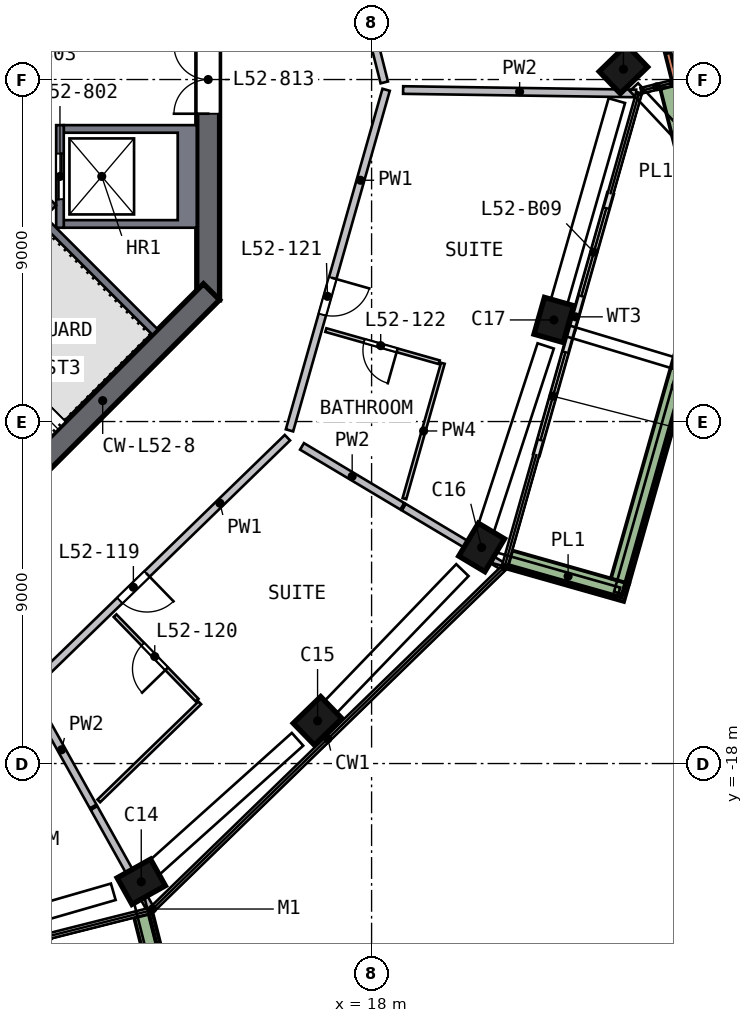
"""IFC4 building model, lengths in metres.
Left out: names, types, materials, properties, quantities, classifications, styles, units other than length and angle.
Written with IfcOpenShell. Run it as: python <this file> out.ifc"""

import sys

from ifc_helpers import new_model, si_unit, direction, frame, frame_2d, origin, origin_2d, place, context, subcontext, project, spatial, polyline, rectangle, outline, extrude, element, fill, save


model = new_model("IFC4")
c1 = context("Model", 3, precision=1e-05, world=origin(), true_north=direction((0.0, 1.0)))
c2 = subcontext(c1, "Body", "Model", "MODEL_VIEW")
j1 = project(units=[si_unit("LENGTHUNIT", "METRE"), si_unit("PLANEANGLEUNIT", "RADIAN")], contexts=[c1])
p1 = place(None, origin())
s1 = spatial("IfcSite", under=j1, at=p1, CompositionType="ELEMENT")
p2 = place(p1, origin())
s2 = spatial("IfcBuilding", under=s1, at=p2, CompositionType="ELEMENT")
p3 = place(p2, frame((0.0, 0.0, 212.5)))
s3 = spatial("IfcBuildingStorey", under=s2, at=p3, CompositionType="ELEMENT", Elevation=212.5)
p4 = place(p3, frame((11.818, -21.181, 0.0), z_axis=(0.100237911, 0.057070939, 0.993325359), x_axis=(-0.867359933, -0.484131141, 0.115342033)))
e1 = element("IfcColumn", 1, at=p4, inside=s3, PredefinedType="COLUMN", context=c2, shape_type="SweptSolid", body=[
    extrude(rectangle(XDim=1.0, YDim=0.8, at=origin_2d()), origin(), (0.0, 0.0, 1.0), 3.02),
])
p5 = place(p3, frame((16.482, -16.972, 0.0), z_axis=(0.080054672, 0.079084312, 0.993648288), x_axis=(0.712786983, 0.692295124, -0.112526346)))
e2 = element("IfcColumn", 2, at=p5, inside=s3, PredefinedType="COLUMN", context=c2, shape_type="SweptSolid", body=[
    extrude(rectangle(XDim=1.0, YDim=0.8, at=origin_2d()), origin(), (0.0, 0.0, 1.0), 3.019),
])
p6 = place(p3, frame((20.825, -12.434, 0.0), z_axis=(0.058283654, 0.099510649, 0.993328066), x_axis=(-0.509282854, -0.852837949, 0.115318722)))
e3 = element("IfcColumn", 3, at=p6, inside=s3, PredefinedType="COLUMN", context=c2, shape_type="SweptSolid", body=[
    extrude(rectangle(XDim=1.0, YDim=0.8, at=origin_2d()), origin(), (0.0, 0.0, 1.0), 3.02),
])
p7 = place(p3, frame((22.76, -6.458, 0.0), z_axis=(0.029838507, 0.108518363, 0.993646531), x_axis=(0.271559126, 0.955819005, -0.112541864)))
e4 = element("IfcColumn", 4, at=p7, inside=s3, PredefinedType="COLUMN", context=c2, shape_type="SweptSolid", body=[
    extrude(rectangle(XDim=1.0, YDim=0.8, at=origin_2d()), origin(), (0.0, 0.0, 1.0), 3.019),
])
p8 = place(p3, frame((24.629, 0.129, 0.0), z_axis=(-0.001616418, 0.117028664, 0.993127222), x_axis=(-0.719717147, -0.689631939, 0.080093807)))
e5 = element("IfcColumn", 5, at=p8, inside=s3, PredefinedType="COLUMN", context=c2, shape_type="SweptSolid", body=[
    extrude(rectangle(XDim=1.0, YDim=0.8, at=origin_2d()), origin(), (0.0, 0.0, 1.0), 3.021),
])
p9 = place(p3, frame((13.7, -5.799, 0.0), z_axis=(0.0, 0.0, 1.0), x_axis=(0.0, 1.0, 0.0)))
e6 = element("IfcWall", 6, at=p9, inside=s3, PredefinedType="SHEAR", context=c2, shape_type="SweptSolid", body=[
    extrude(rectangle(XDim=11.598, YDim=0.6, at=frame_2d((5.799, 0.0))), origin(), (0.0, 0.0, 1.0), 3.5),
])
p10 = place(p9, frame((4.899, 0.0, 0.0)))
e7 = element("IfcOpeningElement", 7, at=p10, cuts=e6, PredefinedType="OPENING", context=c2, shape_type="SweptSolid", body=[
    extrude(rectangle(XDim=1.8, YDim=2.1, at=frame_2d((0.9, 1.05))), frame((0.0, 0.31, 0.0), z_axis=(0.0, -1.0, 0.0), x_axis=(1.0, 0.0, 0.0)), (0.0, 0.0, 1.0), 0.62),
])
p11 = place(p3, frame((5.587, -13.788, 0.0), z_axis=(0.0, 0.0, 1.0), x_axis=(0.707106781, 0.707106781, 0.0)))
e8 = element("IfcWall", 8, at=p11, inside=s3, PredefinedType="SHEAR", context=c2, shape_type="SweptSolid", body=[
    extrude(rectangle(XDim=11.598, YDim=0.6, at=frame_2d((5.799, 0.0))), origin(), (0.0, 0.0, 1.0), 3.5),
])
p12 = place(p11, frame((2.099, 0.0, 0.0)))
e9 = element("IfcOpeningElement", 9, at=p12, cuts=e8, PredefinedType="OPENING", context=c2, shape_type="SweptSolid", body=[
    extrude(rectangle(XDim=1.2, YDim=2.1, at=frame_2d((0.6, 1.05))), frame((0.0, 0.31, 0.0), z_axis=(0.0, -1.0, 0.0), x_axis=(1.0, 0.0, 0.0)), (0.0, 0.0, 1.0), 0.62),
])
p13 = place(p3, frame((26.008, -0.142, 0.0), z_axis=(0.0, 0.0, 1.0), x_axis=(-0.244679801, 0.969603937, 0.0)))
e10 = element("IfcWall", 10, at=p13, inside=s3, PredefinedType="SOLIDWALL", context=c2, shape_type="SweptSolid", body=[
    extrude(rectangle(XDim=1.875, YDim=0.15, at=frame_2d((0.938, 0.0))), origin(), (0.0, 0.0, 1.0), 3.0),
])
p14 = place(p3, frame((22.337, -9.872, 0.0), z_axis=(0.0, 0.0, 1.0), x_axis=(0.272994706, 0.962015536, 0.0)))
e11 = element("IfcWall", 11, at=p14, inside=s3, PredefinedType="SOLIDWALL", context=c2, shape_type="SweptSolid", body=[
    extrude(rectangle(XDim=3.4, YDim=0.15, at=frame_2d((1.7, 0.0))), origin(), (0.0, 0.0, 1.0), 2.935),
])
p15 = place(p14, frame((0.4, 0.0, 0.0)))
e12 = element("IfcOpeningElement", 12, at=p15, cuts=e11, PredefinedType="OPENING", context=c2, shape_type="SweptSolid", body=[
    extrude(rectangle(XDim=2.4, YDim=2.4, at=frame_2d((1.2, 1.2))), frame((0.0, 0.085, 0.0), z_axis=(0.0, -1.0, 0.0), x_axis=(1.0, 0.0, 0.0)), (0.0, 0.0, 1.0), 0.17),
])
p16 = place(p3, frame((23.265, -6.601, 0.0), z_axis=(0.0, 0.0, 1.0), x_axis=(0.272953064, 0.962027351, 0.0)))
e13 = element("IfcWall", 13, at=p16, inside=s3, PredefinedType="SOLIDWALL", context=c2, shape_type="SweptSolid", body=[
    extrude(rectangle(XDim=3.74, YDim=0.15, at=frame_2d((1.87, 0.0))), origin(), (0.0, 0.0, 1.0), 2.935),
])
p17 = place(p16, frame((0.94, 0.0, 0.0)))
e14 = element("IfcOpeningElement", 14, at=p17, cuts=e13, PredefinedType="OPENING", context=c2, shape_type="SweptSolid", body=[
    extrude(rectangle(XDim=2.4, YDim=2.4, at=frame_2d((1.2, 1.2))), frame((0.0, 0.085, 0.0), z_axis=(0.0, -1.0, 0.0), x_axis=(1.0, 0.0, 0.0)), (0.0, 0.0, 1.0), 0.17),
])
p18 = place(p3, frame((12.655, -24.61, 0.0), z_axis=(0.0, 0.0, 1.0), x_axis=(-0.244684701, 0.969602701, 0.0)))
e15 = element("IfcWall", 15, at=p18, inside=s3, PredefinedType="SOLIDWALL", context=c2, shape_type="SweptSolid", body=[
    extrude(rectangle(XDim=2.699, YDim=0.5, at=frame_2d((1.35, 0.0))), origin(), (0.0, 0.0, 1.0), 0.7),
])
p19 = place(p3, frame((21.632, -12.634, 0.0), z_axis=(0.0, 0.0, 1.0), x_axis=(0.962020571, -0.272976962, 0.0)))
e16 = element("IfcWall", 16, at=p19, inside=s3, PredefinedType="SOLIDWALL", context=c2, shape_type="SweptSolid", body=[
    extrude(rectangle(XDim=3.199, YDim=0.5, at=frame_2d((1.6, 0.0))), origin(), (0.0, 0.0, 1.0), 0.7),
])
p20 = place(p3, frame((24.537, -13.199, 0.0), z_axis=(0.0, 0.0, 1.0), x_axis=(0.272958972, 0.962025675, 0.0)))
e17 = element("IfcWall", 17, at=p20, inside=s3, PredefinedType="SOLIDWALL", context=c2, shape_type="SweptSolid", body=[
    extrude(rectangle(XDim=10.653, YDim=0.5, at=frame_2d((5.326, 0.0))), origin(), (0.0, 0.0, 1.0), 0.7),
])
p21 = place(p3, frame((26.262, -1.864, 0.0), z_axis=(0.0, 0.0, 1.0), x_axis=(-0.244592852, 0.969625875, 0.0)))
e18 = element("IfcWall", 18, at=p21, inside=s3, PredefinedType="SOLIDWALL", context=c2, shape_type="SweptSolid", body=[
    extrude(rectangle(XDim=1.731, YDim=0.5, at=frame_2d((0.865, 0.0))), origin(), (0.0, 0.0, 1.0), 0.7),
])
p22 = place(p3, origin())
e19 = element("IfcWall", 19, at=p22, inside=s3, PredefinedType="SOLIDWALL", context=c2, shape_type="SweptSolid", body=[
    extrude(outline(polyline([(13.4, -3.9), (9.9, -3.9), (9.9, -3.7), (12.9, -3.7), (12.9, -1.4), (9.9, -1.4), (9.9, -1.2), (13.4, -1.2), (13.4, -3.9)])), origin(), (0.0, 0.0, 1.0), 3.0),
])
p23 = place(p3, frame((9.8, -1.2, 0.0), z_axis=(0.0, 0.0, 1.0), x_axis=(0.0, -1.0, 0.0)))
e20 = element("IfcWall", 20, at=p23, inside=s3, PredefinedType="SOLIDWALL", context=c2, shape_type="SweptSolid", body=[
    extrude(rectangle(XDim=2.7, YDim=0.2, at=frame_2d((1.35, 0.0))), origin(), (0.0, 0.0, 1.0), 3.0),
])
p24 = place(p23, frame((0.75, 0.0, 0.0)))
e21 = element("IfcOpeningElement", 21, at=p24, cuts=e20, PredefinedType="OPENING", context=c2, shape_type="SweptSolid", body=[
    extrude(rectangle(XDim=1.2, YDim=2.1, at=frame_2d((0.6, 1.05))), frame((0.0, 0.11, 0.0), z_axis=(0.0, -1.0, 0.0), x_axis=(1.0, 0.0, 0.0)), (0.0, 0.0, 1.0), 0.22),
])
p25 = place(p3, frame((9.629, -3.24, 0.0), z_axis=(0.0, 0.0, 1.0), x_axis=(-0.707120946, -0.707092617, 0.0)))
e22 = element("IfcWall", 22, at=p25, inside=s3, PredefinedType="SOLIDWALL", context=c2, shape_type="SweptSolid", body=[
    extrude(rectangle(XDim=8.618, YDim=0.2, at=frame_2d((4.309, 0.0))), origin(), (0.0, 0.0, 1.0), 3.0),
])
p26 = place(p25, frame((7.018, 0.0, 0.0)))
e23 = element("IfcOpeningElement", 23, at=p26, cuts=e22, PredefinedType="OPENING", context=c2, shape_type="SweptSolid", body=[
    extrude(rectangle(XDim=1.2, YDim=2.1, at=frame_2d((0.6, 1.05))), frame((0.0, 0.11, 0.0), z_axis=(0.0, -1.0, 0.0), x_axis=(1.0, 0.0, 0.0)), (0.0, 0.0, 1.0), 0.22),
])
p27 = place(p3, frame((9.334, -3.677, 0.0), z_axis=(0.0, 0.0, 1.0), x_axis=(0.707135845, -0.707077716, 0.0)))
e24 = element("IfcWall", 24, at=p27, inside=s3, PredefinedType="SOLIDWALL", context=c2, shape_type="SweptSolid", body=[
    extrude(rectangle(XDim=4.2, YDim=0.2, at=frame_2d((2.1, 0.0))), origin(), (0.0, 0.0, 1.0), 3.0),
])
p28 = place(p3, frame((15.785, -9.425, 0.0), z_axis=(0.0, 0.0, 1.0), x_axis=(-0.717395, -0.696666645, 0.0)))
e25 = element("IfcWall", 25, at=p28, inside=s3, PredefinedType="SOLIDWALL", context=c2, shape_type="SweptSolid", body=[
    extrude(rectangle(XDim=9.316, YDim=0.2, at=frame_2d((4.658, 0.0))), origin(), (0.0, 0.0, 1.0), 3.0),
])
p29 = place(p28, frame((5.15, 0.0, 0.0)))
e26 = element("IfcOpeningElement", 26, at=p29, cuts=e25, PredefinedType="OPENING", context=c2, shape_type="SweptSolid", body=[
    extrude(rectangle(XDim=1.0, YDim=2.1, at=frame_2d((0.5, 1.05))), frame((0.0, 0.11, 0.0), z_axis=(0.0, -1.0, 0.0), x_axis=(1.0, 0.0, 0.0)), (0.0, 0.0, 1.0), 0.22),
])
p30 = place(p3, frame((18.383, -0.27, 0.0), z_axis=(0.0, 0.0, 1.0), x_axis=(-0.272948627, -0.96202861, 0.0)))
e27 = element("IfcWall", 27, at=p30, inside=s3, PredefinedType="SOLIDWALL", context=c2, shape_type="SweptSolid", body=[
    extrude(rectangle(XDim=9.317, YDim=0.2, at=frame_2d((4.658, 0.0))), origin(), (0.0, 0.0, 1.0), 3.0),
])
p31 = place(p30, frame((5.15, 0.0, 0.0)))
e28 = element("IfcOpeningElement", 28, at=p31, cuts=e27, PredefinedType="OPENING", context=c2, shape_type="SweptSolid", body=[
    extrude(rectangle(XDim=1.0, YDim=2.1, at=frame_2d((0.5, 1.05))), frame((0.0, 0.11, 0.0), z_axis=(0.0, -1.0, 0.0), x_axis=(1.0, 0.0, 0.0)), (0.0, 0.0, 1.0), 0.22),
])
p32 = place(p3, frame((16.055, 8.958, 0.0), z_axis=(0.0, 0.0, 1.0), x_axis=(0.244643731, -0.969613039, 0.0)))
e29 = element("IfcWall", 29, at=p32, inside=s3, PredefinedType="SOLIDWALL", context=c2, shape_type="SweptSolid", body=[
    extrude(rectangle(XDim=9.317, YDim=0.2, at=frame_2d((4.658, 0.0))), origin(), (0.0, 0.0, 1.0), 3.0),
])
p33 = place(p32, frame((3.881, 0.0, 0.0)))
e30 = element("IfcOpeningElement", 30, at=p33, cuts=e29, PredefinedType="OPENING", context=c2, shape_type="SweptSolid", body=[
    extrude(rectangle(XDim=1.8, YDim=2.1, at=frame_2d((0.9, 1.05))), frame((0.0, 0.11, 0.0), z_axis=(0.0, -1.0, 0.0), x_axis=(1.0, 0.0, 0.0)), (0.0, 0.0, 1.0), 0.22),
])
p34 = place(p3, frame((9.008, -16.145, 0.0), z_axis=(0.0, 0.0, 1.0), x_axis=(0.487261051, -0.873256359, 0.0)))
e31 = element("IfcWall", 31, at=p34, inside=s3, PredefinedType="SOLIDWALL", context=c2, shape_type="SweptSolid", body=[
    extrude(rectangle(XDim=3.419, YDim=0.2, at=frame_2d((1.709, 0.0))), origin(), (0.0, 0.0, 1.0), 3.0),
])
p35 = place(p3, frame((10.696, -19.17, 0.0), z_axis=(0.0, 0.0, 1.0), x_axis=(0.487287097, -0.873241825, 0.0)))
e32 = element("IfcWall", 32, at=p35, inside=s3, PredefinedType="SOLIDWALL", context=c2, shape_type="SweptSolid", body=[
    extrude(rectangle(XDim=3.012, YDim=0.2, at=frame_2d((1.506, 0.0))), origin(), (0.0, 0.0, 1.0), 3.0),
])
p36 = place(p3, frame((16.169, -9.654, 0.0), z_axis=(0.0, 0.0, 1.0), x_axis=(0.858604919, -0.512637877, 0.0)))
e33 = element("IfcWall", 33, at=p36, inside=s3, PredefinedType="SOLIDWALL", context=c2, shape_type="SweptSolid", body=[
    extrude(rectangle(XDim=3.075, YDim=0.2, at=frame_2d((1.537, 0.0))), origin(), (0.0, 0.0, 1.0), 3.0),
])
p37 = place(p3, frame((18.849, -11.254, 0.0), z_axis=(0.0, 0.0, 1.0), x_axis=(0.858599774, -0.512646494, 0.0)))
e34 = element("IfcWall", 34, at=p37, inside=s3, PredefinedType="SOLIDWALL", context=c2, shape_type="SweptSolid", body=[
    extrude(rectangle(XDim=3.011, YDim=0.2, at=frame_2d((1.506, 0.0))), origin(), (0.0, 0.0, 1.0), 3.0),
])
p38 = place(p3, frame((24.961, -0.366, 0.0), z_axis=(0.0, 0.0, 1.0), x_axis=(-0.999892659, 0.014651609, 0.0)))
e35 = element("IfcWall", 35, at=p38, inside=s3, PredefinedType="SOLIDWALL", context=c2, shape_type="SweptSolid", body=[
    extrude(rectangle(XDim=6.132, YDim=0.2, at=frame_2d((3.066, 0.0))), origin(), (0.0, 0.0, 1.0), 3.0),
])
p39 = place(p3, frame((13.479, -16.404, 0.0), z_axis=(0.0, 0.0, 1.0), x_axis=(-0.71737914, -0.696682976, 0.0)))
e36 = element("IfcWall", 36, at=p39, inside=s3, PredefinedType="PARTITIONING", context=c2, shape_type="SweptSolid", body=[
    extrude(rectangle(XDim=3.704, YDim=0.1, at=frame_2d((1.852, 0.0))), origin(), (0.0, 0.0, 1.0), 3.0),
])
p40 = place(p3, frame((13.409, -16.332, 0.0), z_axis=(0.0, 0.0, 1.0), x_axis=(-0.696635178, 0.717425556, 0.0)))
e37 = element("IfcWall", 37, at=p40, inside=s3, PredefinedType="PARTITIONING", context=c2, shape_type="SweptSolid", body=[
    extrude(rectangle(XDim=3.1, YDim=0.1, at=frame_2d((1.55, 0.0))), origin(), (0.0, 0.0, 1.0), 3.0),
])
p41 = place(p40, frame((1.15, 0.0, 0.0)))
e38 = element("IfcOpeningElement", 38, at=p41, cuts=e37, PredefinedType="OPENING", context=c2, shape_type="SweptSolid", body=[
    extrude(rectangle(XDim=0.9, YDim=2.1, at=frame_2d((0.45, 1.05))), frame((0.0, 0.06, 0.0), z_axis=(0.0, -1.0, 0.0), x_axis=(1.0, 0.0, 0.0)), (0.0, 0.0, 1.0), 0.12),
])
p42 = place(p3, frame((19.779, -7.439, 0.0), z_axis=(0.0, 0.0, 1.0), x_axis=(-0.96202752, 0.272952471, 0.0)))
e39 = element("IfcWall", 39, at=p42, inside=s3, PredefinedType="PARTITIONING", context=c2, shape_type="SweptSolid", body=[
    extrude(rectangle(XDim=3.1, YDim=0.1, at=frame_2d((1.55, 0.0))), origin(), (0.0, 0.0, 1.0), 3.0),
])
p43 = place(p42, frame((1.15, 0.0, 0.0)))
e40 = element("IfcOpeningElement", 40, at=p43, cuts=e39, PredefinedType="OPENING", context=c2, shape_type="SweptSolid", body=[
    extrude(rectangle(XDim=0.9, YDim=2.1, at=frame_2d((0.45, 1.05))), frame((0.0, 0.06, 0.0), z_axis=(0.0, -1.0, 0.0), x_axis=(1.0, 0.0, 0.0)), (0.0, 0.0, 1.0), 0.12),
])
p44 = place(p3, frame((19.875, -7.467, 0.0), z_axis=(0.0, 0.0, 1.0), x_axis=(-0.2729534, -0.962027256, 0.0)))
e41 = element("IfcWall", 41, at=p44, inside=s3, PredefinedType="PARTITIONING", context=c2, shape_type="SweptSolid", body=[
    extrude(rectangle(XDim=3.704, YDim=0.1, at=frame_2d((1.852, 0.0))), origin(), (0.0, 0.0, 1.0), 3.0),
])
p45 = place(p15, origin())
e42 = element("IfcDoor", 42, at=p45, inside=s3, OperationType="SLIDING_TO_RIGHT", PredefinedType="DOOR", context=c2, shape_type="SweptSolid", body=[
    extrude(rectangle(XDim=2.4, YDim=2.4, at=frame_2d((1.2, 1.2))), frame((0.0, 0.025, 0.0), z_axis=(0.0, -1.0, 0.0), x_axis=(1.0, 0.0, 0.0)), (0.0, 0.0, 1.0), 0.05),
])
fill(e12, e42)
p46 = place(p17, origin())
e43 = element("IfcDoor", 43, at=p46, inside=s3, OperationType="SLIDING_TO_LEFT", PredefinedType="DOOR", context=c2, shape_type="SweptSolid", body=[
    extrude(rectangle(XDim=2.4, YDim=2.4, at=frame_2d((1.2, 1.2))), frame((0.0, 0.025, 0.0), z_axis=(0.0, -1.0, 0.0), x_axis=(1.0, 0.0, 0.0)), (0.0, 0.0, 1.0), 0.05),
])
fill(e14, e43)
p47 = place(p24, origin())
e44 = element("IfcDoor", 44, at=p47, inside=s3, OperationType="DOUBLE_DOOR_SLIDING", PredefinedType="DOOR", context=c2, shape_type="SweptSolid", body=[
    extrude(rectangle(XDim=1.2, YDim=2.1, at=frame_2d((0.6, 1.05))), frame((0.0, 0.025, 0.0), z_axis=(0.0, -1.0, 0.0), x_axis=(1.0, 0.0, 0.0)), (0.0, 0.0, 1.0), 0.05),
])
fill(e21, e44)
p48 = place(p10, origin())
e45 = element("IfcDoor", 45, at=p48, inside=s3, OperationType="DOUBLE_DOOR_SINGLE_SWING", PredefinedType="DOOR", context=c2, shape_type="SweptSolid", body=[
    extrude(rectangle(XDim=1.8, YDim=2.1, at=frame_2d((0.9, 1.05))), frame((0.0, 0.025, 0.0), z_axis=(0.0, -1.0, 0.0), x_axis=(1.0, 0.0, 0.0)), (0.0, 0.0, 1.0), 0.05),
])
fill(e7, e45)
p49 = place(p29, origin())
e46 = element("IfcDoor", 46, at=p49, inside=s3, OperationType="SINGLE_SWING_LEFT", PredefinedType="DOOR", context=c2, shape_type="SweptSolid", body=[
    extrude(rectangle(XDim=1.0, YDim=2.1, at=frame_2d((0.5, 1.05))), frame((0.0, 0.025, 0.0), z_axis=(0.0, -1.0, 0.0), x_axis=(1.0, 0.0, 0.0)), (0.0, 0.0, 1.0), 0.05),
])
fill(e26, e46)
p50 = place(p41, origin())
e47 = element("IfcDoor", 47, at=p50, inside=s3, OperationType="SINGLE_SWING_LEFT", PredefinedType="DOOR", context=c2, shape_type="SweptSolid", body=[
    extrude(rectangle(XDim=0.9, YDim=2.1, at=frame_2d((0.45, 1.05))), frame((0.0, 0.025, 0.0), z_axis=(0.0, -1.0, 0.0), x_axis=(1.0, 0.0, 0.0)), (0.0, 0.0, 1.0), 0.05),
])
fill(e38, e47)
p51 = place(p31, origin())
e48 = element("IfcDoor", 48, at=p51, inside=s3, OperationType="SINGLE_SWING_LEFT", PredefinedType="DOOR", context=c2, shape_type="SweptSolid", body=[
    extrude(rectangle(XDim=1.0, YDim=2.1, at=frame_2d((0.5, 1.05))), frame((0.0, 0.025, 0.0), z_axis=(0.0, -1.0, 0.0), x_axis=(1.0, 0.0, 0.0)), (0.0, 0.0, 1.0), 0.05),
])
fill(e28, e48)
p52 = place(p43, origin())
e49 = element("IfcDoor", 49, at=p52, inside=s3, OperationType="SINGLE_SWING_LEFT", PredefinedType="DOOR", context=c2, shape_type="SweptSolid", body=[
    extrude(rectangle(XDim=0.9, YDim=2.1, at=frame_2d((0.45, 1.05))), frame((0.0, 0.025, 0.0), z_axis=(0.0, -1.0, 0.0), x_axis=(1.0, 0.0, 0.0)), (0.0, 0.0, 1.0), 0.05),
])
fill(e40, e49)
save(model, sys.argv[1])
